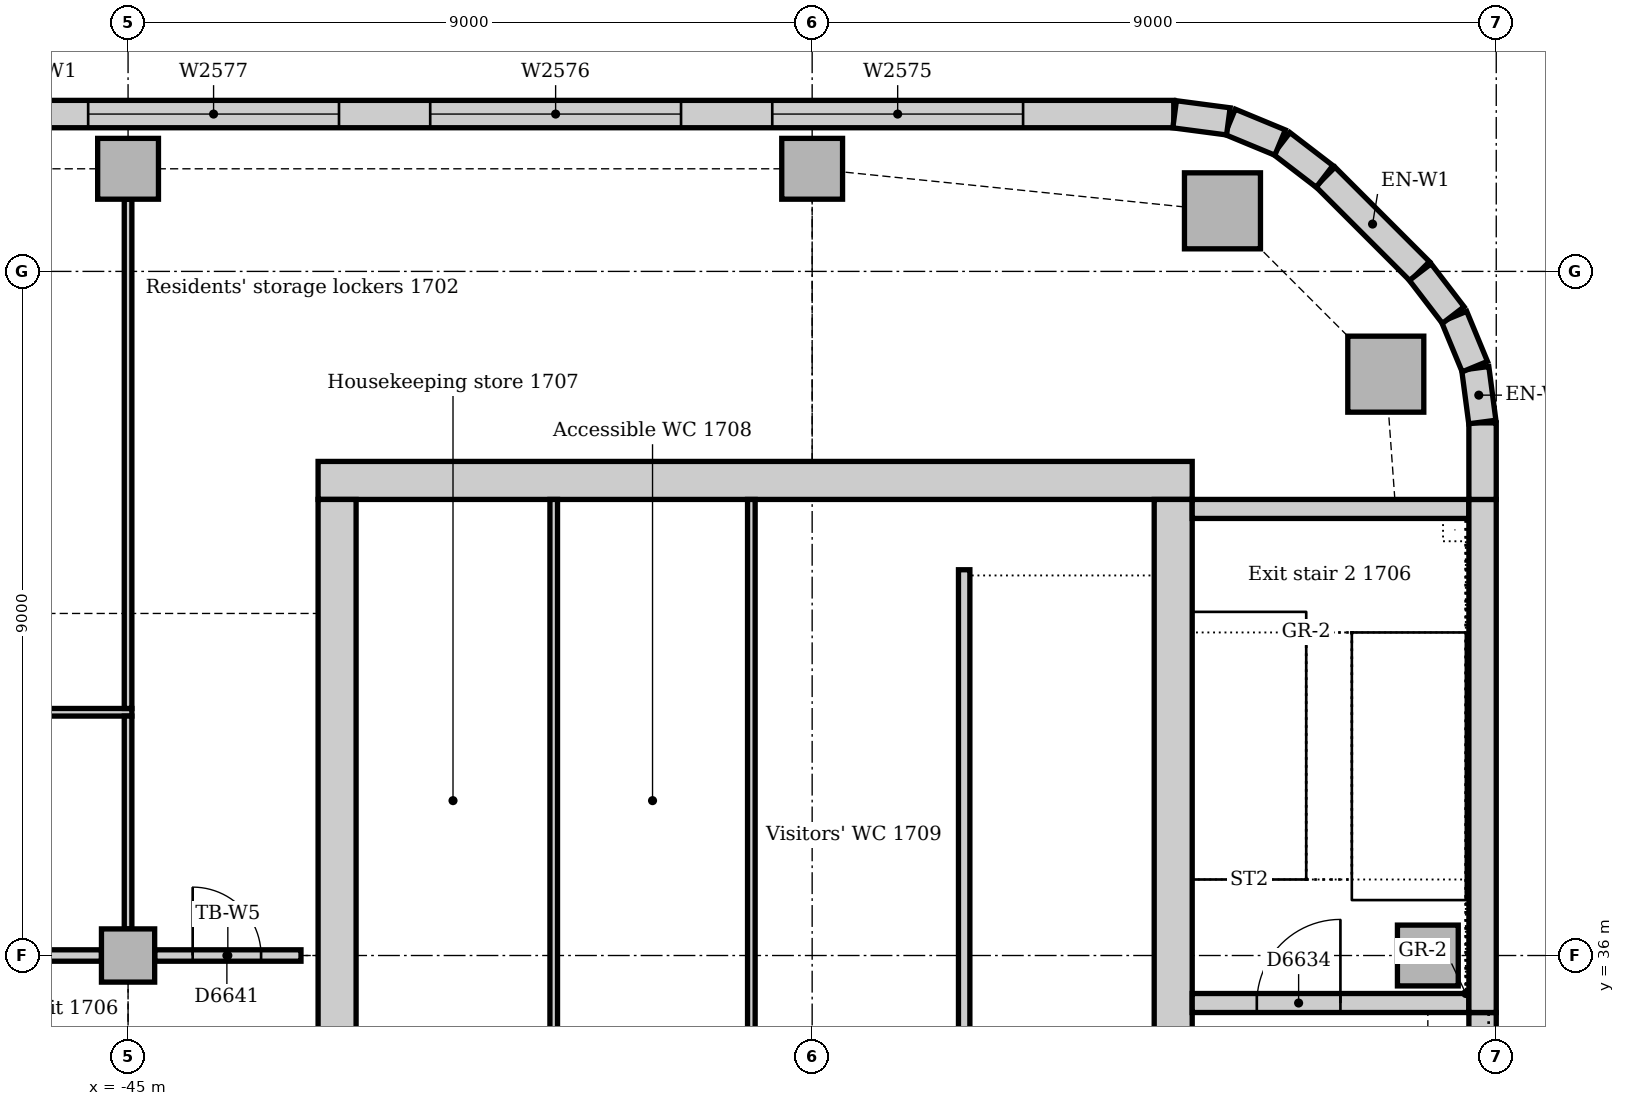
"""IFC4 building model, lengths in metres.
Left out: names, types, materials, properties, quantities, classifications, styles, units other than length and angle.
Written with IfcOpenShell. Run it as: python <this file> out.ifc"""

import sys

from ifc_helpers import new_model, si_unit, direction, frame, frame_2d, origin, origin_2d, place, context, subcontext, project, spatial, rectangle, extrude, element, fill, save


model = new_model("IFC4")
c1 = context("Model", 3, precision=1e-05, world=origin(), true_north=direction((0.0, 1.0)))
c2 = subcontext(c1, "Body", "Model", "MODEL_VIEW")
j1 = project(units=[si_unit("LENGTHUNIT", "METRE"), si_unit("PLANEANGLEUNIT", "RADIAN")], contexts=[c1])
p1 = place(None, origin())
s1 = spatial("IfcSite", under=j1, at=p1, CompositionType="ELEMENT")
p2 = place(p1, origin())
s2 = spatial("IfcBuilding", under=s1, at=p2, CompositionType="ELEMENT")
p3 = place(p2, frame((0.0, 0.0, 75.0)))
s3 = spatial("IfcBuildingStorey", under=s2, at=p3, CompositionType="ELEMENT", Elevation=75.0)
p4 = place(p3, frame((-31.0, 42.25, 0.0), z_axis=(0.0, 0.0, 1.0), x_axis=(-1.0, 0.0, 0.0)))
e1 = element("IfcWall", 1, at=p4, inside=s3, PredefinedType="SOLIDWALL", context=c2, shape_type="SweptSolid", body=[
    extrude(rectangle(XDim=11.5, YDim=0.5, at=frame_2d((5.75, 0.0))), origin(), (0.0, 0.0, 1.0), 4.0),
])
p5 = place(p3, frame((-31.25, 30.5, 0.0), z_axis=(0.0, 0.0, 1.0), x_axis=(0.0, 1.0, 0.0)))
e2 = element("IfcWall", 2, at=p5, inside=s3, PredefinedType="SOLIDWALL", context=c2, shape_type="SweptSolid", body=[
    extrude(rectangle(XDim=11.5, YDim=0.5, at=frame_2d((5.75, 0.0))), origin(), (0.0, 0.0, 1.0), 4.0),
])
p6 = place(p5, frame((0.85, 0.0, 0.0)))
e3 = element("IfcOpeningElement", 3, at=p6, cuts=e2, PredefinedType="OPENING", context=c2, shape_type="SweptSolid", body=[
    extrude(rectangle(XDim=1.8, YDim=2.1, at=frame_2d((0.9, 1.05))), frame((0.0, 0.26, 0.0), z_axis=(0.0, -1.0, 0.0), x_axis=(1.0, 0.0, 0.0)), (0.0, 0.0, 1.0), 0.52),
])
p7 = place(p3, frame((-42.25, 42.0, 0.0), z_axis=(0.0, 0.0, 1.0), x_axis=(0.0, -1.0, 0.0)))
e4 = element("IfcWall", 4, at=p7, inside=s3, PredefinedType="SOLIDWALL", context=c2, shape_type="SweptSolid", body=[
    extrude(rectangle(XDim=11.5, YDim=0.5, at=frame_2d((5.75, 0.0))), origin(), (0.0, 0.0, 1.0), 4.0),
])
p8 = place(p7, frame((8.85, 0.0, 0.0)))
e5 = element("IfcOpeningElement", 5, at=p8, cuts=e4, PredefinedType="OPENING", context=c2, shape_type="SweptSolid", body=[
    extrude(rectangle(XDim=1.8, YDim=2.1, at=frame_2d((0.9, 1.05))), frame((0.0, 0.26, 0.0), z_axis=(0.0, -1.0, 0.0), x_axis=(1.0, 0.0, 0.0)), (0.0, 0.0, 1.0), 0.52),
])
p9 = place(p3, frame((-31.0, 35.375, 0.0), z_axis=(0.0, 0.0, 1.0), x_axis=(1.0, 0.0, 0.0)))
e6 = element("IfcWall", 6, at=p9, inside=s3, PredefinedType="SOLIDWALL", context=c2, shape_type="SweptSolid", body=[
    extrude(rectangle(XDim=3.64, YDim=0.25, at=frame_2d((1.82, 0.0))), origin(), (0.0, 0.0, 1.0), 4.0),
])
p10 = place(p9, frame((0.85, 0.0, 0.0)))
e7 = element("IfcOpeningElement", 7, at=p10, cuts=e6, PredefinedType="OPENING", context=c2, shape_type="SweptSolid", body=[
    extrude(rectangle(XDim=1.1, YDim=2.1, at=frame_2d((0.55, 1.05))), frame((0.0, 0.135, 0.0), z_axis=(0.0, -1.0, 0.0), x_axis=(1.0, 0.0, 0.0)), (0.0, 0.0, 1.0), 0.27),
])
p11 = place(p3, frame((-27.36, 41.875, 0.0), z_axis=(0.0, 0.0, 1.0), x_axis=(-1.0, 0.0, 0.0)))
e8 = element("IfcWall", 8, at=p11, inside=s3, PredefinedType="SOLIDWALL", context=c2, shape_type="SweptSolid", body=[
    extrude(rectangle(XDim=3.64, YDim=0.25, at=frame_2d((1.82, 0.0))), origin(), (0.0, 0.0, 1.0), 4.0),
])
for number, where, z_axis, x_axis in (
    (9, (-28.453, 43.648, 0.0), (0.0, 0.0, 1.0), (1.0, 0.0, 0.0)),
    (10, (-30.602, 45.797, 0.0), (0.0, 0.0, 1.0), (1.0, 0.0, 0.0)),
):
    element("IfcColumn", number, at=place(p3, frame(where, z_axis=z_axis, x_axis=x_axis)), inside=s3, PredefinedType="COLUMN", context=c2, shape_type="SweptSolid", body=[
        extrude(rectangle(XDim=1.0, YDim=1.0, at=origin_2d()), origin(), (0.0, 0.0, 1.0), 3.85),
    ])
p12 = place(p3, frame((-27.9, 36.0, 0.0), z_axis=(0.0, 0.0, 1.0), x_axis=(1.0, 0.0, 0.0)))
e11 = element("IfcColumn", 11, at=p12, inside=s3, PredefinedType="COLUMN", context=c2, shape_type="SweptSolid", body=[
    extrude(rectangle(XDim=0.8, YDim=0.8, at=origin_2d()), origin(), (0.0, 0.0, 1.0), 4.0),
])
for number, where, z_axis, x_axis in (
    (12, (-45.0, 46.35, 0.0), (0.0, 0.0, 1.0), (1.0, 0.0, 0.0)),
    (13, (-36.0, 46.35, 0.0), (0.0, 0.0, 1.0), (1.0, 0.0, 0.0)),
):
    element("IfcColumn", number, at=place(p3, frame(where, z_axis=z_axis, x_axis=x_axis)), inside=s3, PredefinedType="COLUMN", context=c2, shape_type="SweptSolid", body=[
        extrude(rectangle(XDim=0.8, YDim=0.8, at=origin_2d()), origin(), (0.0, 0.0, 1.0), 3.85),
    ])
p13 = place(p3, frame((-45.0, 36.0, 0.0), z_axis=(0.0, 0.0, 1.0), x_axis=(1.0, 0.0, 0.0)))
e14 = element("IfcColumn", 14, at=p13, inside=s3, PredefinedType="COLUMN", context=c2, shape_type="SweptSolid", body=[
    extrude(rectangle(XDim=0.7, YDim=0.7, at=origin_2d()), origin(), (0.0, 0.0, 1.0), 3.85),
])
p14 = place(p3, frame((-27.18, 27.75, 0.0), z_axis=(0.0, 0.0, 1.0), x_axis=(0.0, 1.0, 0.0)))
e15 = element("IfcWall", 15, at=p14, inside=s3, PredefinedType="STANDARD", context=c2, shape_type="SweptSolid", body=[
    extrude(rectangle(XDim=7.5, YDim=0.36, at=frame_2d((3.75, 0.0))), origin(), (0.0, 0.0, 1.0), 3.85),
])
p15 = place(p14, frame((2.85, 0.0, 1.2)))
e16 = element("IfcOpeningElement", 16, at=p15, cuts=e15, PredefinedType="OPENING", context=c2, shape_type="SweptSolid", body=[
    extrude(rectangle(XDim=1.8, YDim=1.2, at=frame_2d((0.9, 0.6))), frame((0.0, 0.19, 0.0), z_axis=(0.0, -1.0, 0.0), x_axis=(1.0, 0.0, 0.0)), (0.0, 0.0, 1.0), 0.38),
])
p16 = place(p3, frame((-27.18, 35.25, 0.0), z_axis=(0.0, 0.0, 1.0), x_axis=(0.0, 1.0, 0.0)))
e17 = element("IfcWall", 17, at=p16, inside=s3, PredefinedType="STANDARD", context=c2, shape_type="SweptSolid", body=[
    extrude(rectangle(XDim=6.75, YDim=0.36, at=frame_2d((3.375, 0.0))), origin(), (0.0, 0.0, 1.0), 3.85),
])
p17 = place(p3, frame((-27.18, 42.0, 0.0), z_axis=(0.0, 0.0, 1.0), x_axis=(0.0, 1.0, 0.0)))
e18 = element("IfcWall", 18, at=p17, inside=s3, PredefinedType="STANDARD", context=c2, shape_type="SweptSolid", body=[
    extrude(rectangle(XDim=1.007, YDim=0.36, at=frame_2d((0.504, 0.0))), origin(), (0.0, 0.0, 1.0), 3.85),
])
p18 = place(p3, frame((-28.006, 45.001, 0.0), z_axis=(0.0, 0.0, 1.0), x_axis=(-0.707106781187, 0.707106781187, 0.0)))
e19 = element("IfcWall", 19, at=p18, inside=s3, PredefinedType="STANDARD", context=c2, shape_type="SweptSolid", body=[
    extrude(rectangle(XDim=1.757, YDim=0.36, at=frame_2d((0.879, 0.0))), origin(), (0.0, 0.0, 1.0), 3.85),
])
p19 = place(p3, frame((-31.243, 47.07, 0.0), z_axis=(0.0, 0.0, 1.0), x_axis=(-1.0, 0.0, 0.0)))
e20 = element("IfcWall", 20, at=p19, inside=s3, PredefinedType="STANDARD", context=c2, shape_type="SweptSolid", body=[
    extrude(rectangle(XDim=29.765, YDim=0.36, at=frame_2d((14.882, 0.0))), origin(), (0.0, 0.0, 1.0), 3.85),
])
p20 = place(p19, frame((1.982, 0.0, 0.9)))
e21 = element("IfcOpeningElement", 21, at=p20, cuts=e20, PredefinedType="OPENING", context=c2, shape_type="SweptSolid", body=[
    extrude(rectangle(XDim=3.3, YDim=1.6, at=frame_2d((1.65, 0.8))), frame((0.0, 0.19, 0.0), z_axis=(0.0, -1.0, 0.0), x_axis=(1.0, 0.0, 0.0)), (0.0, 0.0, 1.0), 0.38),
])
p21 = place(p19, frame((6.482, 0.0, 0.9)))
e22 = element("IfcOpeningElement", 22, at=p21, cuts=e20, PredefinedType="OPENING", context=c2, shape_type="SweptSolid", body=[
    extrude(rectangle(XDim=3.3, YDim=1.6, at=frame_2d((1.65, 0.8))), frame((0.0, 0.19, 0.0), z_axis=(0.0, -1.0, 0.0), x_axis=(1.0, 0.0, 0.0)), (0.0, 0.0, 1.0), 0.38),
])
p22 = place(p19, frame((10.982, 0.0, 0.9)))
e23 = element("IfcOpeningElement", 23, at=p22, cuts=e20, PredefinedType="OPENING", context=c2, shape_type="SweptSolid", body=[
    extrude(rectangle(XDim=3.3, YDim=1.6, at=frame_2d((1.65, 0.8))), frame((0.0, 0.19, 0.0), z_axis=(0.0, -1.0, 0.0), x_axis=(1.0, 0.0, 0.0)), (0.0, 0.0, 1.0), 0.38),
])
p23 = place(p19, frame((15.482, 0.0, 0.9)))
e24 = element("IfcOpeningElement", 24, at=p23, cuts=e20, PredefinedType="OPENING", context=c2, shape_type="SweptSolid", body=[
    extrude(rectangle(XDim=3.3, YDim=1.6, at=frame_2d((1.65, 0.8))), frame((0.0, 0.19, 0.0), z_axis=(0.0, -1.0, 0.0), x_axis=(1.0, 0.0, 0.0)), (0.0, 0.0, 1.0), 0.38),
])
p24 = place(p19, frame((19.982, 0.0, 0.9)))
e25 = element("IfcOpeningElement", 25, at=p24, cuts=e20, PredefinedType="OPENING", context=c2, shape_type="SweptSolid", body=[
    extrude(rectangle(XDim=3.3, YDim=1.6, at=frame_2d((1.65, 0.8))), frame((0.0, 0.19, 0.0), z_axis=(0.0, -1.0, 0.0), x_axis=(1.0, 0.0, 0.0)), (0.0, 0.0, 1.0), 0.38),
])
p25 = place(p19, frame((24.482, 0.0, 0.9)))
e26 = element("IfcOpeningElement", 26, at=p25, cuts=e20, PredefinedType="OPENING", context=c2, shape_type="SweptSolid", body=[
    extrude(rectangle(XDim=3.3, YDim=1.6, at=frame_2d((1.65, 0.8))), frame((0.0, 0.19, 0.0), z_axis=(0.0, -1.0, 0.0), x_axis=(1.0, 0.0, 0.0)), (0.0, 0.0, 1.0), 0.38),
])
for number, where, z_axis, x_axis in (
    (27, (-27.183, 43.019, 0.0), (0.0, 0.0, 1.0), (-0.131, 0.991, 0.0)),
    (28, (-27.282, 43.747, 0.0), (0.0, 0.0, 1.0), (-0.383, 0.924, 0.0)),
):
    element("IfcWall", number, at=place(p3, frame(where, z_axis=z_axis, x_axis=x_axis)), inside=s3, PredefinedType="STANDARD", context=c2, shape_type="SweptSolid", body=[
        extrude(rectangle(XDim=0.713, YDim=0.36, at=frame_2d((0.356, 0.0))), origin(), (0.0, 0.0, 1.0), 3.85),
    ])
for number, where, z_axis, x_axis in (
    (29, (-27.566, 44.425, 0.0), (0.0, 0.0, 1.0), (-0.609, 0.793, 0.0)),
    (30, (-29.259, 46.25, 0.0), (0.0, 0.0, 1.0), (-0.793, 0.609, 0.0)),
):
    element("IfcWall", number, at=place(p3, frame(where, z_axis=z_axis, x_axis=x_axis)), inside=s3, PredefinedType="STANDARD", context=c2, shape_type="SweptSolid", body=[
        extrude(rectangle(XDim=0.713, YDim=0.36, at=frame_2d((0.357, 0.0))), origin(), (0.0, 0.0, 1.0), 3.85),
    ])
for number, where, z_axis, x_axis in (
    (31, (-29.844, 46.695, 0.0), (0.0, 0.0, 1.0), (-0.924, 0.383, 0.0)),
    (32, (-30.524, 46.974, 0.0), (0.0, 0.0, 1.0), (-0.991, 0.131, 0.0)),
):
    element("IfcWall", number, at=place(p3, frame(where, z_axis=z_axis, x_axis=x_axis)), inside=s3, PredefinedType="STANDARD", context=c2, shape_type="SweptSolid", body=[
        extrude(rectangle(XDim=0.713, YDim=0.36, at=frame_2d((0.356, 0.0))), origin(), (0.0, 0.0, 1.0), 3.85),
    ])
p26 = place(p3, frame((-34.0, 41.075, 0.0), z_axis=(0.0, 0.0, 1.0), x_axis=(0.0, -1.0, 0.0)))
e33 = element("IfcWall", 33, at=p26, inside=s3, PredefinedType="SOLIDWALL", context=c2, shape_type="SweptSolid", body=[
    extrude(rectangle(XDim=7.0, YDim=0.15, at=frame_2d((3.5, 0.0))), origin(), (0.0, 0.0, 1.0), 4.0),
])
for number, where, z_axis, x_axis in (
    (34, (-39.4, 34.075, 0.0), (0.0, 0.0, 1.0), (0.0, 1.0, 0.0)),
    (35, (-36.8, 34.075, 0.0), (0.0, 0.0, 1.0), (0.0, 1.0, 0.0)),
):
    element("IfcWall", number, at=place(p3, frame(where, z_axis=z_axis, x_axis=x_axis)), inside=s3, PredefinedType="PARTITIONING", context=c2, shape_type="SweptSolid", body=[
        extrude(rectangle(XDim=7.925, YDim=0.1, at=frame_2d((3.962, 0.0))), origin(), (0.0, 0.0, 1.0), 3.85),
    ])
p27 = place(p3, frame((-44.65, 36.0, 0.0), z_axis=(0.0, 0.0, 1.0), x_axis=(1.0, 0.0, 0.0)))
e36 = element("IfcWall", 36, at=p27, inside=s3, PredefinedType="PARTITIONING", context=c2, shape_type="SweptSolid", body=[
    extrude(rectangle(XDim=1.925, YDim=0.15, at=frame_2d((0.963, 0.0))), origin(), (0.0, 0.0, 1.0), 3.602),
])
p28 = place(p27, frame((0.5, 0.0, 0.0)))
e37 = element("IfcOpeningElement", 37, at=p28, cuts=e36, PredefinedType="OPENING", context=c2, shape_type="SweptSolid", body=[
    extrude(rectangle(XDim=0.9, YDim=2.1, at=frame_2d((0.45, 1.05))), frame((0.0, 0.085, 0.0), z_axis=(0.0, -1.0, 0.0), x_axis=(1.0, 0.0, 0.0)), (0.0, 0.0, 1.0), 0.17),
])
p29 = place(p3, frame((-53.65, 36.0, 0.0), z_axis=(0.0, 0.0, 1.0), x_axis=(1.0, 0.0, 0.0)))
e38 = element("IfcWall", 38, at=p29, inside=s3, PredefinedType="PARTITIONING", context=c2, shape_type="SweptSolid", body=[
    extrude(rectangle(XDim=8.3, YDim=0.15, at=frame_2d((4.15, 0.0))), origin(), (0.0, 0.0, 1.0), 3.158),
])
p30 = place(p29, frame((4.7, 0.0, 0.0)))
e39 = element("IfcOpeningElement", 39, at=p30, cuts=e38, PredefinedType="OPENING", context=c2, shape_type="SweptSolid", body=[
    extrude(rectangle(XDim=1.0, YDim=2.1, at=frame_2d((0.5, 1.05))), frame((0.0, 0.085, 0.0), z_axis=(0.0, -1.0, 0.0), x_axis=(1.0, 0.0, 0.0)), (0.0, 0.0, 1.0), 0.17),
])
p31 = place(p3, frame((-50.925, 39.2, 0.0), z_axis=(0.0, 0.0, 1.0), x_axis=(1.0, 0.0, 0.0)))
e40 = element("IfcWall", 40, at=p31, inside=s3, PredefinedType="PARTITIONING", context=c2, shape_type="SweptSolid", body=[
    extrude(rectangle(XDim=5.975, YDim=0.1, at=frame_2d((2.987, 0.0))), origin(), (0.0, 0.0, 1.0), 3.85),
])
p32 = place(p31, frame((2.025, 0.0, 0.0)))
e41 = element("IfcOpeningElement", 41, at=p32, cuts=e40, PredefinedType="OPENING", context=c2, shape_type="SweptSolid", body=[
    extrude(rectangle(XDim=0.9, YDim=2.1, at=frame_2d((0.45, 1.05))), frame((0.0, 0.06, 0.0), z_axis=(0.0, -1.0, 0.0), x_axis=(1.0, 0.0, 0.0)), (0.0, 0.0, 1.0), 0.12),
])
p33 = place(p3, frame((-45.0, 39.25, 0.0), z_axis=(0.0, 0.0, 1.0), x_axis=(0.0, 1.0, 0.0)))
e42 = element("IfcWall", 42, at=p33, inside=s3, PredefinedType="PARTITIONING", context=c2, shape_type="SweptSolid", body=[
    extrude(rectangle(XDim=6.7, YDim=0.1, at=frame_2d((3.35, 0.0))), origin(), (0.0, 0.0, 1.0), 3.256),
])
p34 = place(p3, frame((-45.0, 36.35, 0.0), z_axis=(0.0, 0.0, 1.0), x_axis=(0.0, 1.0, 0.0)))
e43 = element("IfcWall", 43, at=p34, inside=s3, PredefinedType="PARTITIONING", context=c2, shape_type="SweptSolid", body=[
    extrude(rectangle(XDim=2.8, YDim=0.1, at=frame_2d((1.4, 0.0))), origin(), (0.0, 0.0, 1.0), 3.256),
])
p35 = place(p20, origin())
e44 = element("IfcWindow", 44, at=p35, inside=s3, PartitioningType="SINGLE_PANEL", PredefinedType="WINDOW", context=c2, shape_type="SweptSolid", body=[
    extrude(rectangle(XDim=3.3, YDim=1.6, at=frame_2d((1.65, 0.8))), frame((0.0, 0.13, 0.0), z_axis=(0.0, -1.0, 0.0), x_axis=(1.0, 0.0, 0.0)), (0.0, 0.0, 1.0), 0.06),
])
fill(e21, e44)
p36 = place(p21, origin())
e45 = element("IfcWindow", 45, at=p36, inside=s3, PartitioningType="SINGLE_PANEL", PredefinedType="WINDOW", context=c2, shape_type="SweptSolid", body=[
    extrude(rectangle(XDim=3.3, YDim=1.6, at=frame_2d((1.65, 0.8))), frame((0.0, 0.13, 0.0), z_axis=(0.0, -1.0, 0.0), x_axis=(1.0, 0.0, 0.0)), (0.0, 0.0, 1.0), 0.06),
])
fill(e22, e45)
p37 = place(p22, origin())
e46 = element("IfcWindow", 46, at=p37, inside=s3, PartitioningType="SINGLE_PANEL", PredefinedType="WINDOW", context=c2, shape_type="SweptSolid", body=[
    extrude(rectangle(XDim=3.3, YDim=1.6, at=frame_2d((1.65, 0.8))), frame((0.0, 0.13, 0.0), z_axis=(0.0, -1.0, 0.0), x_axis=(1.0, 0.0, 0.0)), (0.0, 0.0, 1.0), 0.06),
])
fill(e23, e46)
p38 = place(p10, origin())
e47 = element("IfcDoor", 47, at=p38, inside=s3, OperationType="SINGLE_SWING_RIGHT", PredefinedType="DOOR", context=c2, shape_type="SweptSolid", body=[
    extrude(rectangle(XDim=1.1, YDim=2.1, at=frame_2d((0.55, 1.05))), frame((0.0, 0.025, 0.0), z_axis=(0.0, -1.0, 0.0), x_axis=(1.0, 0.0, 0.0)), (0.0, 0.0, 1.0), 0.05),
])
fill(e7, e47)
p39 = place(p28, origin())
e48 = element("IfcDoor", 48, at=p39, inside=s3, OperationType="SINGLE_SWING_LEFT", PredefinedType="DOOR", context=c2, shape_type="SweptSolid", body=[
    extrude(rectangle(XDim=0.9, YDim=2.1, at=frame_2d((0.45, 1.05))), frame((0.0, 0.025, 0.0), z_axis=(0.0, -1.0, 0.0), x_axis=(1.0, 0.0, 0.0)), (0.0, 0.0, 1.0), 0.05),
])
fill(e37, e48)
save(model, sys.argv[1])
